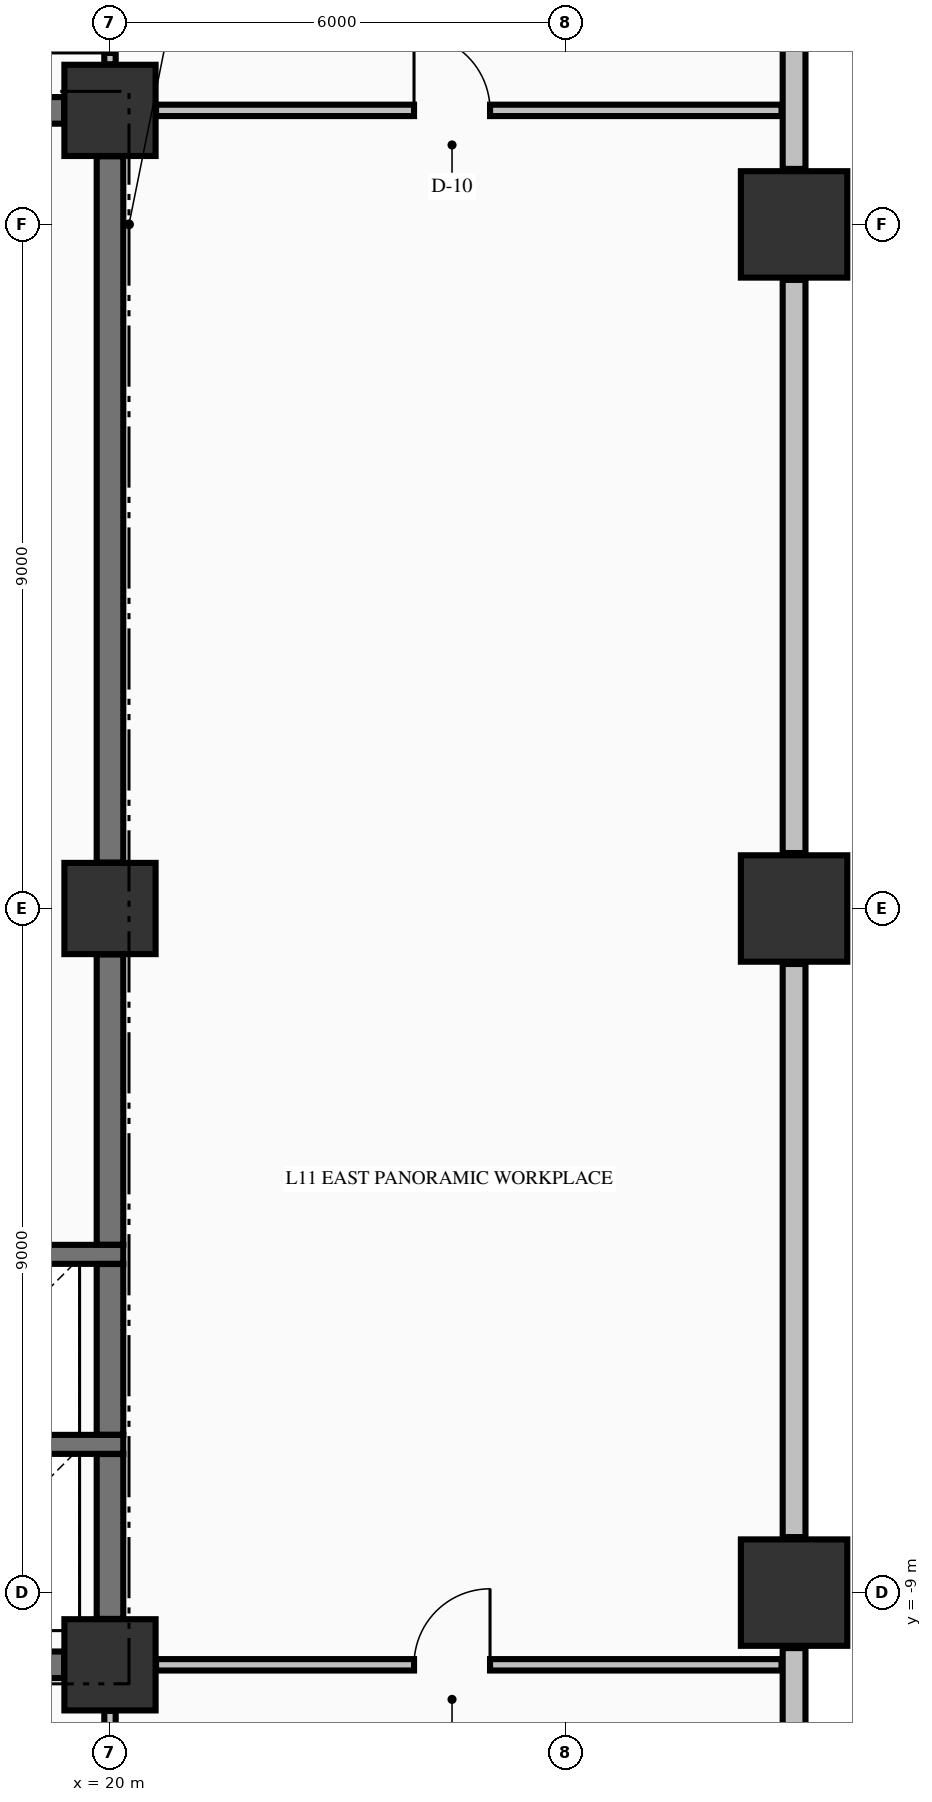
"""IFC4 building model, lengths in metres.
Left out: names, types, materials, properties, quantities, classifications, styles, units other than length and angle.
Written with IfcOpenShell. Run it as: python <this file> out.ifc"""

import sys

from ifc_helpers import new_model, si_unit, direction, frame, frame_2d, origin, origin_2d, place, context, subcontext, project, spatial, rectangle, extrude, element, fill, save


model = new_model("IFC4")
c1 = context("Model", 3, precision=1e-05, world=origin(), true_north=direction((0.0, 1.0)))
c2 = subcontext(c1, "Body", "Model", "MODEL_VIEW")
j1 = project(units=[si_unit("LENGTHUNIT", "METRE"), si_unit("PLANEANGLEUNIT", "RADIAN")], contexts=[c1])
p1 = place(None, origin())
s1 = spatial("IfcSite", under=j1, at=p1, CompositionType="ELEMENT")
p2 = place(p1, origin())
s2 = spatial("IfcBuilding", under=s1, at=p2, CompositionType="ELEMENT")
p3 = place(p2, frame((0.0, 0.0, 48.62)))
s3 = spatial("IfcBuildingStorey", under=s2, at=p3, CompositionType="ELEMENT", Elevation=48.62)
for number, where, z_axis, x_axis in (
    (1, (29.0, -9.0, -0.25), (0.0, 0.0, 1.0), (1.0, 0.0, 0.0)),
    (2, (29.0, 0.0, -0.25), (0.0, 0.0, 1.0), (1.0, 0.0, 0.0)),
    (3, (29.0, 9.0, -0.25), (0.0, 0.0, 1.0), (1.0, 0.0, 0.0)),
):
    element("IfcColumn", number, at=place(p3, frame(where, z_axis=z_axis, x_axis=x_axis)), inside=s3, PredefinedType="COLUMN", context=c2, shape_type="SweptSolid", body=[
        extrude(rectangle(XDim=1.4, YDim=1.4, at=origin_2d()), origin(), (0.0, 0.0, 1.0), 3.395),
    ])
for number, where, z_axis, x_axis in (
    (4, (20.0, -9.95, -0.25), (0.0, 0.0, 1.0), (1.0, 0.0, 0.0)),
    (5, (20.0, 10.5, -0.25), (0.0, 0.0, 1.0), (1.0, 0.0, 0.0)),
    (6, (20.0, 0.0, -0.25), (0.0, 0.0, 1.0), (1.0, 0.0, 0.0)),
):
    element("IfcColumn", number, at=place(p3, frame(where, z_axis=z_axis, x_axis=x_axis)), inside=s3, PredefinedType="COLUMN", context=c2, shape_type="SweptSolid", body=[
        extrude(rectangle(XDim=1.2, YDim=1.2, at=origin_2d()), origin(), (0.0, 0.0, 1.0), 3.395),
    ])
p4 = place(p3, frame((29.0, -22.27, 0.0), z_axis=(0.0, 0.0, 1.0), x_axis=(0.0, 1.0, 0.0)))
e7 = element("IfcWall", 7, at=p4, inside=s3, PredefinedType="STANDARD", context=c2, shape_type="SweptSolid", body=[
    extrude(rectangle(XDim=12.54, YDim=0.3, at=frame_2d((6.27, 0.0))), origin(), (0.0, 0.0, 1.0), 2.537),
])
for number, where, z_axis, x_axis in (
    (8, (29.0, -8.27, 0.0), (0.0, 0.0, 1.0), (0.0, 1.0, 0.0)),
    (9, (29.0, 0.73, 0.0), (0.0, 0.0, 1.0), (0.0, 1.0, 0.0)),
):
    element("IfcWall", number, at=place(p3, frame(where, z_axis=z_axis, x_axis=x_axis)), inside=s3, PredefinedType="STANDARD", context=c2, shape_type="SweptSolid", body=[
        extrude(rectangle(XDim=7.54, YDim=0.3, at=frame_2d((3.77, 0.0))), origin(), (0.0, 0.0, 1.0), 2.537),
    ])
p5 = place(p3, frame((29.0, 9.73, 0.0), z_axis=(0.0, 0.0, 1.0), x_axis=(0.0, 1.0, 0.0)))
e10 = element("IfcWall", 10, at=p5, inside=s3, PredefinedType="STANDARD", context=c2, shape_type="SweptSolid", body=[
    extrude(rectangle(XDim=12.54, YDim=0.3, at=frame_2d((6.27, 0.0))), origin(), (0.0, 0.0, 1.0), 2.537),
])
p6 = place(p3, frame((14.7, -9.95, 0.0), z_axis=(0.0, 0.0, 1.0), x_axis=(1.0, 0.0, 0.0)))
e11 = element("IfcWall", 11, at=p6, inside=s3, PredefinedType="SHEAR", context=c2, shape_type="SweptSolid", body=[
    extrude(rectangle(XDim=4.696, YDim=0.35, at=frame_2d((2.348, 0.0))), origin(), (0.0, 0.0, 1.0), 3.145),
])
p7 = place(p6, frame((0.8, 0.0, 0.0)))
e12 = element("IfcOpeningElement", 12, at=p7, cuts=e11, PredefinedType="OPENING", context=c2, shape_type="SweptSolid", body=[
    extrude(rectangle(XDim=0.9, YDim=2.15, at=frame_2d((0.45, 1.075))), frame((0.0, 0.185, 0.0), z_axis=(0.0, -1.0, 0.0), x_axis=(1.0, 0.0, 0.0)), (0.0, 0.0, 1.0), 0.37),
])
for number, where, z_axis, x_axis in (
    (13, (17.025, -7.05, 0.0), (0.0, 0.0, 1.0), (1.0, 0.0, 0.0)),
    (14, (17.025, -4.55, 0.0), (0.0, 0.0, 1.0), (1.0, 0.0, 0.0)),
):
    element("IfcWall", number, at=place(p3, frame(where, z_axis=z_axis, x_axis=x_axis)), inside=s3, PredefinedType="SOLIDWALL", context=c2, shape_type="SweptSolid", body=[
        extrude(rectangle(XDim=3.15, YDim=0.25, at=frame_2d((1.575, 0.0))), origin(), (0.0, 0.0, 1.0), 3.145),
    ])
p8 = place(p3, frame((14.7, 10.5, 0.0), z_axis=(0.0, 0.0, 1.0), x_axis=(1.0, 0.0, 0.0)))
e15 = element("IfcWall", 15, at=p8, inside=s3, PredefinedType="SHEAR", context=c2, shape_type="SweptSolid", body=[
    extrude(rectangle(XDim=4.696, YDim=0.35, at=frame_2d((2.348, 0.0))), origin(), (0.0, 0.0, 1.0), 3.145),
])
p9 = place(p8, frame((0.85, 0.0, 0.0)))
e16 = element("IfcOpeningElement", 16, at=p9, cuts=e15, PredefinedType="OPENING", context=c2, shape_type="SweptSolid", body=[
    extrude(rectangle(XDim=0.9, YDim=2.15, at=frame_2d((0.45, 1.075))), frame((0.0, 0.185, 0.0), z_axis=(0.0, -1.0, 0.0), x_axis=(1.0, 0.0, 0.0)), (0.0, 0.0, 1.0), 0.37),
])
p10 = place(p8, frame((3.4, 0.0, 0.0)))
e17 = element("IfcOpeningElement", 17, at=p10, cuts=e15, PredefinedType="OPENING", context=c2, shape_type="SweptSolid", body=[
    extrude(rectangle(XDim=0.9, YDim=2.15, at=frame_2d((0.45, 1.075))), frame((0.0, 0.185, 0.0), z_axis=(0.0, -1.0, 0.0), x_axis=(1.0, 0.0, 0.0)), (0.0, 0.0, 1.0), 0.37),
])
p11 = place(p3, frame((20.606, -9.95, 0.0), z_axis=(0.0, 0.0, 1.0), x_axis=(1.0, 0.0, 0.0)))
e18 = element("IfcWall", 18, at=p11, inside=s3, PredefinedType="PARTITIONING", context=c2, shape_type="SweptSolid", body=[
    extrude(rectangle(XDim=8.229, YDim=0.15, at=frame_2d((4.115, 0.0))), origin(), (0.0, 0.0, 1.0), 3.145),
])
p12 = place(p11, frame((3.394, 0.0, 0.0)))
e19 = element("IfcOpeningElement", 19, at=p12, cuts=e18, PredefinedType="OPENING", context=c2, shape_type="SweptSolid", body=[
    extrude(rectangle(XDim=1.0, YDim=2.15, at=frame_2d((0.5, 1.075))), frame((0.0, 0.085, 0.0), z_axis=(0.0, -1.0, 0.0), x_axis=(1.0, 0.0, 0.0)), (0.0, 0.0, 1.0), 0.17),
])
p13 = place(p3, frame((20.606, 10.5, 0.0), z_axis=(0.0, 0.0, 1.0), x_axis=(1.0, 0.0, 0.0)))
e20 = element("IfcWall", 20, at=p13, inside=s3, PredefinedType="PARTITIONING", context=c2, shape_type="SweptSolid", body=[
    extrude(rectangle(XDim=8.229, YDim=0.15, at=frame_2d((4.115, 0.0))), origin(), (0.0, 0.0, 1.0), 3.145),
])
p14 = place(p13, frame((3.394, 0.0, 0.0)))
e21 = element("IfcOpeningElement", 21, at=p14, cuts=e20, PredefinedType="OPENING", context=c2, shape_type="SweptSolid", body=[
    extrude(rectangle(XDim=1.0, YDim=2.15, at=frame_2d((0.5, 1.075))), frame((0.0, 0.085, 0.0), z_axis=(0.0, -1.0, 0.0), x_axis=(1.0, 0.0, 0.0)), (0.0, 0.0, 1.0), 0.17),
])
p15 = place(p3, frame((20.0, -9.346, 0.0), z_axis=(0.0, 0.0, 1.0), x_axis=(0.0, 1.0, 0.0)))
e22 = element("IfcWall", 22, at=p15, inside=s3, PredefinedType="SHEAR", context=c2, shape_type="SweptSolid", body=[
    extrude(rectangle(XDim=2.169, YDim=0.35, at=frame_2d((1.084, 0.0))), origin(), (0.0, 0.0, 1.0), 3.145),
])
p16 = place(p3, frame((20.0, -6.923, 0.0), z_axis=(0.0, 0.0, 1.0), x_axis=(0.0, 1.0, 0.0)))
e23 = element("IfcWall", 23, at=p16, inside=s3, PredefinedType="SHEAR", context=c2, shape_type="SweptSolid", body=[
    extrude(rectangle(XDim=2.246, YDim=0.35, at=frame_2d((1.123, 0.0))), origin(), (0.0, 0.0, 1.0), 3.145),
])
p17 = place(p3, frame((20.0, -4.423, 0.0), z_axis=(0.0, 0.0, 1.0), x_axis=(0.0, 1.0, 0.0)))
e24 = element("IfcWall", 24, at=p17, inside=s3, PredefinedType="SHEAR", context=c2, shape_type="SweptSolid", body=[
    extrude(rectangle(XDim=3.819, YDim=0.35, at=frame_2d((1.91, 0.0))), origin(), (0.0, 0.0, 1.0), 3.145),
])
p18 = place(p3, frame((20.0, 0.604, 0.0), z_axis=(0.0, 0.0, 1.0), x_axis=(0.0, 1.0, 0.0)))
e25 = element("IfcWall", 25, at=p18, inside=s3, PredefinedType="SHEAR", context=c2, shape_type="SweptSolid", body=[
    extrude(rectangle(XDim=9.292, YDim=0.35, at=frame_2d((4.646, 0.0))), origin(), (0.0, 0.0, 1.0), 3.145),
])
p19 = place(p3, frame((20.0, -13.022, 0.0), z_axis=(0.0, 0.0, 1.0), x_axis=(0.0, 1.0, 0.0)))
e26 = element("IfcWall", 26, at=p19, inside=s3, PredefinedType="PARTITIONING", context=c2, shape_type="SweptSolid", body=[
    extrude(rectangle(XDim=2.466, YDim=0.15, at=frame_2d((1.233, 0.0))), origin(), (0.0, 0.0, 1.0), 2.485),
])
p20 = place(p19, frame((1.027, 0.0, 0.0)))
e27 = element("IfcOpeningElement", 27, at=p20, cuts=e26, PredefinedType="OPENING", context=c2, shape_type="SweptSolid", body=[
    extrude(rectangle(XDim=0.95, YDim=2.15, at=frame_2d((0.475, 1.075))), frame((0.0, 0.085, 0.0), z_axis=(0.0, -1.0, 0.0), x_axis=(1.0, 0.0, 0.0)), (0.0, 0.0, 1.0), 0.17),
])
p21 = place(p3, frame((20.0, 11.106, 0.0), z_axis=(0.0, 0.0, 1.0), x_axis=(0.0, 1.0, 0.0)))
e28 = element("IfcWall", 28, at=p21, inside=s3, PredefinedType="PARTITIONING", context=c2, shape_type="SweptSolid", body=[
    extrude(rectangle(XDim=1.766, YDim=0.15, at=frame_2d((0.883, 0.0))), origin(), (0.0, 0.0, 1.0), 2.485),
])
p22 = place(p21, frame((0.15, 0.0, 0.0)))
e29 = element("IfcOpeningElement", 29, at=p22, cuts=e28, PredefinedType="OPENING", context=c2, shape_type="SweptSolid", body=[
    extrude(rectangle(XDim=0.95, YDim=2.15, at=frame_2d((0.475, 1.075))), frame((0.0, 0.085, 0.0), z_axis=(0.0, -1.0, 0.0), x_axis=(1.0, 0.0, 0.0)), (0.0, 0.0, 1.0), 0.17),
])
p23 = place(p22, origin())
e30 = element("IfcDoor", 30, at=p23, inside=s3, OperationType="SINGLE_SWING_LEFT", PredefinedType="DOOR", context=c2, shape_type="SweptSolid", body=[
    extrude(rectangle(XDim=0.95, YDim=2.15, at=frame_2d((0.475, 1.075))), frame((0.0, 0.025, 0.0), z_axis=(0.0, -1.0, 0.0), x_axis=(1.0, 0.0, 0.0)), (0.0, 0.0, 1.0), 0.05),
])
fill(e29, e30)
p24 = place(p14, origin())
e31 = element("IfcDoor", 31, at=p24, inside=s3, OperationType="SINGLE_SWING_LEFT", PredefinedType="DOOR", context=c2, shape_type="SweptSolid", body=[
    extrude(rectangle(XDim=1.0, YDim=2.15, at=frame_2d((0.5, 1.075))), frame((0.0, 0.025, 0.0), z_axis=(0.0, -1.0, 0.0), x_axis=(1.0, 0.0, 0.0)), (0.0, 0.0, 1.0), 0.05),
])
fill(e21, e31)
p25 = place(p12, origin())
e32 = element("IfcDoor", 32, at=p25, inside=s3, OperationType="SINGLE_SWING_RIGHT", PredefinedType="DOOR", context=c2, shape_type="SweptSolid", body=[
    extrude(rectangle(XDim=1.0, YDim=2.15, at=frame_2d((0.5, 1.075))), frame((0.0, 0.025, 0.0), z_axis=(0.0, -1.0, 0.0), x_axis=(1.0, 0.0, 0.0)), (0.0, 0.0, 1.0), 0.05),
])
fill(e19, e32)
save(model, sys.argv[1])
